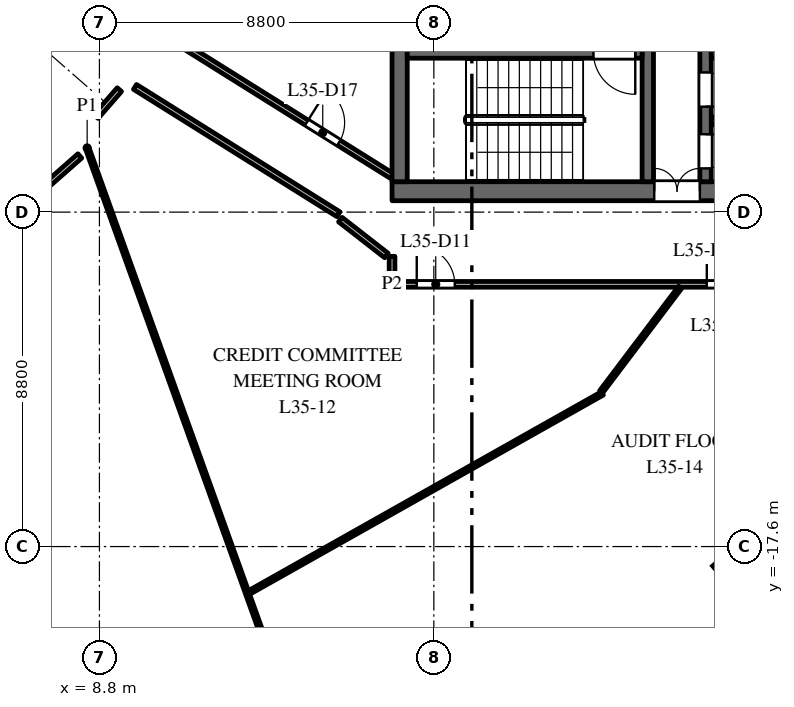
"""IFC4 building model, lengths in metres.
Left out: names, types, materials, properties, quantities, classifications, styles, units other than length and angle.
Written with IfcOpenShell. Run it as: python <this file> out.ifc"""

import sys

from ifc_helpers import new_model, si_unit, direction, frame, frame_2d, origin, origin_2d, place, context, subcontext, project, spatial, rectangle, extrude, element, fill, save


model = new_model("IFC4")
c1 = context("Model", 3, precision=1e-05, world=origin(), true_north=direction((0.0, 1.0)))
c2 = subcontext(c1, "Body", "Model", "MODEL_VIEW")
j1 = project(units=[si_unit("LENGTHUNIT", "METRE"), si_unit("PLANEANGLEUNIT", "RADIAN")], contexts=[c1])
p1 = place(None, origin())
s1 = spatial("IfcSite", under=j1, at=p1, CompositionType="ELEMENT")
p2 = place(p1, origin())
s2 = spatial("IfcBuilding", under=s1, at=p2, CompositionType="ELEMENT")
p3 = place(p2, frame((0.0, 0.0, 154.0)))
s3 = spatial("IfcBuildingStorey", under=s2, at=p3, CompositionType="ELEMENT", Elevation=154.0)
p4 = place(p3, frame((25.783, -18.18, 0.0), z_axis=(0.0, 0.0, 1.0), x_axis=(0.763035199656, 0.646356932419, 0.0)))
e1 = element("IfcColumn", 1, at=p4, inside=s3, PredefinedType="COLUMN", context=c2, shape_type="SweptSolid", body=[
    extrude(rectangle(XDim=1.2, YDim=1.2, at=origin_2d()), origin(), (0.0, 0.0, 1.0), 4.0),
])
p5 = place(p3, frame((16.5, -8.25, 0.0), z_axis=(0.0, 0.0, 1.0), x_axis=(1.0, 0.0, 0.0)))
e2 = element("IfcWall", 2, at=p5, inside=s3, PredefinedType="SHEAR", context=c2, shape_type="SweptSolid", body=[
    extrude(rectangle(XDim=15.0, YDim=0.5, at=frame_2d((7.5, 0.0))), origin(), (0.0, 0.0, 1.0), 3.7),
])
p6 = place(p5, frame((6.9, 0.0, 0.0)))
e3 = element("IfcOpeningElement", 3, at=p6, cuts=e2, PredefinedType="OPENING", context=c2, shape_type="SweptSolid", body=[
    extrude(rectangle(XDim=1.2, YDim=2.1, at=frame_2d((0.6, 1.05))), frame((0.0, 0.26, 0.0), z_axis=(0.0, -1.0, 0.0), x_axis=(1.0, 0.0, 0.0)), (0.0, 0.0, 1.0), 0.52),
])
p7 = place(p5, frame((12.275, 0.0, 0.0)))
e4 = element("IfcOpeningElement", 4, at=p7, cuts=e2, PredefinedType="OPENING", context=c2, shape_type="SweptSolid", body=[
    extrude(rectangle(XDim=0.9, YDim=2.1, at=frame_2d((0.45, 1.05))), frame((0.0, 0.26, 0.0), z_axis=(0.0, -1.0, 0.0), x_axis=(1.0, 0.0, 0.0)), (0.0, 0.0, 1.0), 0.52),
])
p8 = place(p3, frame((24.75, -8.0, 0.0), z_axis=(0.0, 0.0, 1.0), x_axis=(0.0, 1.0, 0.0)))
e5 = element("IfcWall", 5, at=p8, inside=s3, PredefinedType="SHEAR", context=c2, shape_type="SweptSolid", body=[
    extrude(rectangle(XDim=16.0, YDim=0.3, at=frame_2d((8.0, 0.0))), origin(), (0.0, 0.0, 1.0), 3.7),
])
p9 = place(p8, frame((4.425, 0.0, 0.0)))
e6 = element("IfcOpeningElement", 6, at=p9, cuts=e5, PredefinedType="OPENING", context=c2, shape_type="SweptSolid", body=[
    extrude(rectangle(XDim=1.1, YDim=2.1, at=frame_2d((0.55, 1.05))), frame((0.0, 0.16, 0.0), z_axis=(0.0, -1.0, 0.0), x_axis=(1.0, 0.0, 0.0)), (0.0, 0.0, 1.0), 0.32),
])
p10 = place(p8, frame((7.45, 0.0, 0.0)))
e7 = element("IfcOpeningElement", 7, at=p10, cuts=e5, PredefinedType="OPENING", context=c2, shape_type="SweptSolid", body=[
    extrude(rectangle(XDim=1.1, YDim=2.1, at=frame_2d((0.55, 1.05))), frame((0.0, 0.16, 0.0), z_axis=(0.0, -1.0, 0.0), x_axis=(1.0, 0.0, 0.0)), (0.0, 0.0, 1.0), 0.32),
])
p11 = place(p8, frame((10.475, 0.0, 0.0)))
e8 = element("IfcOpeningElement", 8, at=p11, cuts=e5, PredefinedType="OPENING", context=c2, shape_type="SweptSolid", body=[
    extrude(rectangle(XDim=1.1, YDim=2.1, at=frame_2d((0.55, 1.05))), frame((0.0, 0.16, 0.0), z_axis=(0.0, -1.0, 0.0), x_axis=(1.0, 0.0, 0.0)), (0.0, 0.0, 1.0), 0.32),
])
p12 = place(p8, frame((13.75, 0.0, 0.0)))
e9 = element("IfcOpeningElement", 9, at=p12, cuts=e5, PredefinedType="OPENING", context=c2, shape_type="SweptSolid", body=[
    extrude(rectangle(XDim=0.9, YDim=2.1, at=frame_2d((0.45, 1.05))), frame((0.0, 0.16, 0.0), z_axis=(0.0, -1.0, 0.0), x_axis=(1.0, 0.0, 0.0)), (0.0, 0.0, 1.0), 0.32),
])
p13 = place(p8, frame((1.975, 0.0, 0.0)))
e10 = element("IfcOpeningElement", 10, at=p13, cuts=e5, PredefinedType="OPENING", context=c2, shape_type="SweptSolid", body=[
    extrude(rectangle(XDim=0.9, YDim=2.1, at=frame_2d((0.45, 1.05))), frame((0.0, 0.16, 0.0), z_axis=(0.0, -1.0, 0.0), x_axis=(1.0, 0.0, 0.0)), (0.0, 0.0, 1.0), 0.32),
])
p14 = place(p8, frame((0.35, 0.0, 0.0)))
e11 = element("IfcOpeningElement", 11, at=p14, cuts=e5, PredefinedType="OPENING", context=c2, shape_type="SweptSolid", body=[
    extrude(rectangle(XDim=0.9, YDim=2.1, at=frame_2d((0.45, 1.05))), frame((0.0, 0.16, 0.0), z_axis=(0.0, -1.0, 0.0), x_axis=(1.0, 0.0, 0.0)), (0.0, 0.0, 1.0), 0.32),
])
p15 = place(p3, frame((16.7, -8.0, 0.0), z_axis=(0.0, 0.0, 1.0), x_axis=(0.0, 1.0, 0.0)))
e12 = element("IfcWall", 12, at=p15, inside=s3, PredefinedType="SHEAR", context=c2, shape_type="SweptSolid", body=[
    extrude(rectangle(XDim=16.0, YDim=0.4, at=frame_2d((8.0, 0.0))), origin(), (0.0, 0.0, 1.0), 3.7),
])
p16 = place(p3, frame((24.9, -6.4, 0.0), z_axis=(0.0, 0.0, 1.0), x_axis=(1.0, 0.0, 0.0)))
e13 = element("IfcWall", 13, at=p16, inside=s3, PredefinedType="PARTITIONING", context=c2, shape_type="SweptSolid", body=[
    extrude(rectangle(XDim=2.35, YDim=0.2, at=frame_2d((1.175, 0.0))), origin(), (0.0, 0.0, 1.0), 3.7),
])
p17 = place(p3, frame((24.9, -4.6, 0.0), z_axis=(0.0, 0.0, 1.0), x_axis=(1.0, 0.0, 0.0)))
e14 = element("IfcWall", 14, at=p17, inside=s3, PredefinedType="SHEAR", context=c2, shape_type="SweptSolid", body=[
    extrude(rectangle(XDim=6.1, YDim=0.3, at=frame_2d((3.05, 0.0))), origin(), (0.0, 0.0, 1.0), 3.7),
])
p18 = place(p3, frame((23.23, -8.0, 0.0), z_axis=(0.0, 0.0, 1.0), x_axis=(0.0, 1.0, 0.0)))
e15 = element("IfcWall", 15, at=p18, inside=s3, PredefinedType="SHEAR", context=c2, shape_type="SweptSolid", body=[
    extrude(rectangle(XDim=7.875, YDim=0.3, at=frame_2d((3.938, 0.0))), origin(), (0.0, 0.0, 1.0), 3.7),
])
p19 = place(p18, frame((5.15, 0.0, 0.0)))
e16 = element("IfcOpeningElement", 16, at=p19, cuts=e15, PredefinedType="OPENING", context=c2, shape_type="SweptSolid", body=[
    extrude(rectangle(XDim=1.1, YDim=2.1, at=frame_2d((0.55, 1.05))), frame((0.0, 0.16, 0.0), z_axis=(0.0, -1.0, 0.0), x_axis=(1.0, 0.0, 0.0)), (0.0, 0.0, 1.0), 0.32),
])
p20 = place(p3, frame((16.9, -4.6, 0.0), z_axis=(0.0, 0.0, 1.0), x_axis=(1.0, 0.0, 0.0)))
e17 = element("IfcWall", 17, at=p20, inside=s3, PredefinedType="SHEAR", context=c2, shape_type="SweptSolid", body=[
    extrude(rectangle(XDim=6.18, YDim=0.3, at=frame_2d((3.09, 0.0))), origin(), (0.0, 0.0, 1.0), 3.7),
])
p21 = place(p20, frame((4.9, 0.0, 0.0)))
e18 = element("IfcOpeningElement", 18, at=p21, cuts=e17, PredefinedType="OPENING", context=c2, shape_type="SweptSolid", body=[
    extrude(rectangle(XDim=1.1, YDim=2.1, at=frame_2d((0.55, 1.05))), frame((0.0, 0.16, 0.0), z_axis=(0.0, -1.0, 0.0), x_axis=(1.0, 0.0, 0.0)), (0.0, 0.0, 1.0), 0.32),
])
p22 = place(p3, frame((7.458, -8.049, 0.0), z_axis=(0.0, 0.0, 1.0), x_axis=(0.75060787095, 0.660747927782, 0.0)))
e19 = element("IfcWall", 19, at=p22, inside=s3, PredefinedType="PARTITIONING", context=c2, shape_type="SweptSolid", body=[
    extrude(rectangle(XDim=1.1, YDim=0.15, at=frame_2d((0.55, 0.0))), origin(), (0.0, 0.0, 1.0), 3.7),
])
p23 = place(p3, frame((8.477, -7.111, 0.0), z_axis=(0.0, 0.0, 1.0), x_axis=(0.338406456341, -0.941000037357, 0.0)))
e20 = element("IfcWall", 20, at=p23, inside=s3, PredefinedType="PARTITIONING", context=c2, shape_type="SweptSolid", body=[
    extrude(rectangle(XDim=19.418, YDim=0.1, at=frame_2d((9.709, 0.0))), origin(), (0.0, 0.0, 1.0), 2.85),
])
p24 = place(p3, frame((8.709, -6.285, 0.0), z_axis=(0.0, 0.0, 1.0), x_axis=(0.656365478363, 0.754443078578, 0.0)))
e21 = element("IfcWall", 21, at=p24, inside=s3, PredefinedType="PARTITIONING", context=c2, shape_type="SweptSolid", body=[
    extrude(rectangle(XDim=0.938, YDim=0.15, at=frame_2d((0.469, 0.0))), origin(), (0.0, 0.0, 1.0), 3.7),
])
p25 = place(p3, frame((9.736, -5.505, 0.0), z_axis=(0.0, 0.0, 1.0), x_axis=(0.847611500167, -0.53061732424, 0.0)))
e22 = element("IfcWall", 22, at=p25, inside=s3, PredefinedType="PARTITIONING", context=c2, shape_type="SweptSolid", body=[
    extrude(rectangle(XDim=6.315, YDim=0.15, at=frame_2d((3.158, 0.0))), origin(), (0.0, 0.0, 1.0), 3.7),
])
p26 = place(p3, frame((10.752, -4.254, 0.0), z_axis=(0.0, 0.0, 1.0), x_axis=(0.847690706888, -0.530490777917, 0.0)))
e23 = element("IfcWall", 23, at=p26, inside=s3, PredefinedType="PARTITIONING", context=c2, shape_type="SweptSolid", body=[
    extrude(rectangle(XDim=6.781, YDim=0.15, at=frame_2d((3.39, 0.0))), origin(), (0.0, 0.0, 1.0), 3.7),
])
p27 = place(p26, frame((4.129, 0.0, 0.0)))
e24 = element("IfcOpeningElement", 24, at=p27, cuts=e23, PredefinedType="OPENING", context=c2, shape_type="SweptSolid", body=[
    extrude(rectangle(XDim=1.0, YDim=2.1, at=frame_2d((0.5, 1.05))), frame((0.0, 0.085, 0.0), z_axis=(0.0, -1.0, 0.0), x_axis=(1.0, 0.0, 0.0)), (0.0, 0.0, 1.0), 0.17),
])
p28 = place(p3, frame((12.737, -18.809, 0.0), z_axis=(0.0, 0.0, 1.0), x_axis=(0.871198990541, 0.490930054978, 0.0)))
e25 = element("IfcWall", 25, at=p28, inside=s3, PredefinedType="PARTITIONING", context=c2, shape_type="SweptSolid", body=[
    extrude(rectangle(XDim=10.674, YDim=0.1, at=frame_2d((5.337, 0.0))), origin(), (0.0, 0.0, 1.0), 3.7),
])
p29 = place(p3, frame((16.5, -10.7, 0.0), z_axis=(0.0, 0.0, 1.0), x_axis=(0.0, 1.0, 0.0)))
e26 = element("IfcWall", 26, at=p29, inside=s3, PredefinedType="PARTITIONING", context=c2, shape_type="SweptSolid", body=[
    extrude(rectangle(XDim=0.736, YDim=0.15, at=frame_2d((0.368, 0.0))), origin(), (0.0, 0.0, 1.0), 3.7),
])
p30 = place(p3, frame((16.5, -10.7, 0.0), z_axis=(0.0, 0.0, 1.0), x_axis=(1.0, 0.0, 0.0)))
e27 = element("IfcWall", 27, at=p30, inside=s3, PredefinedType="PARTITIONING", context=c2, shape_type="SweptSolid", body=[
    extrude(rectangle(XDim=15.0, YDim=0.15, at=frame_2d((7.5, 0.0))), origin(), (0.0, 0.0, 1.0), 2.75),
])
p31 = place(p30, frame((0.65, 0.0, 0.0)))
e28 = element("IfcOpeningElement", 28, at=p31, cuts=e27, PredefinedType="OPENING", context=c2, shape_type="SweptSolid", body=[
    extrude(rectangle(XDim=1.0, YDim=2.1, at=frame_2d((0.5, 1.05))), frame((0.0, 0.085, 0.0), z_axis=(0.0, -1.0, 0.0), x_axis=(1.0, 0.0, 0.0)), (0.0, 0.0, 1.0), 0.17),
])
p32 = place(p30, frame((8.283, 0.0, 0.0)))
e29 = element("IfcOpeningElement", 29, at=p32, cuts=e27, PredefinedType="OPENING", context=c2, shape_type="SweptSolid", body=[
    extrude(rectangle(XDim=1.0, YDim=2.1, at=frame_2d((0.5, 1.05))), frame((0.0, 0.085, 0.0), z_axis=(0.0, -1.0, 0.0), x_axis=(1.0, 0.0, 0.0)), (0.0, 0.0, 1.0), 0.17),
])
p33 = place(p3, frame((22.002, -13.53, 0.0), z_axis=(0.0, 0.0, 1.0), x_axis=(0.602805050744, 0.797888507749, 0.0)))
e30 = element("IfcWall", 30, at=p33, inside=s3, PredefinedType="PARTITIONING", context=c2, shape_type="SweptSolid", body=[
    extrude(rectangle(XDim=3.449, YDim=0.1, at=frame_2d((1.725, 0.0))), origin(), (0.0, 0.0, 1.0), 2.75),
])
p34 = place(p3, frame((16.352, -9.942, 0.0), z_axis=(0.0, 0.0, 1.0), x_axis=(-0.788950226826, 0.614457109643, 0.0)))
e31 = element("IfcWall", 31, at=p34, inside=s3, PredefinedType="PARTITIONING", context=c2, shape_type="SweptSolid", body=[
    extrude(rectangle(XDim=1.538, YDim=0.15, at=frame_2d((0.769, 0.0))), origin(), (0.0, 0.0, 1.0), 3.7),
])
p35 = place(p21, origin())
e32 = element("IfcDoor", 32, at=p35, inside=s3, OperationType="SINGLE_SWING_RIGHT", PredefinedType="DOOR", context=c2, shape_type="SweptSolid", body=[
    extrude(rectangle(XDim=1.1, YDim=2.1, at=frame_2d((0.55, 1.05))), frame((0.0, 0.025, 0.0), z_axis=(0.0, -1.0, 0.0), x_axis=(1.0, 0.0, 0.0)), (0.0, 0.0, 1.0), 0.05),
])
fill(e18, e32)
p36 = place(p6, origin())
e33 = element("IfcDoor", 33, at=p36, inside=s3, OperationType="DOUBLE_DOOR_DOUBLE_SWING", PredefinedType="DOOR", context=c2, shape_type="SweptSolid", body=[
    extrude(rectangle(XDim=1.2, YDim=2.1, at=frame_2d((0.6, 1.05))), frame((0.0, 0.025, 0.0), z_axis=(0.0, -1.0, 0.0), x_axis=(1.0, 0.0, 0.0)), (0.0, 0.0, 1.0), 0.05),
])
fill(e3, e33)
p37 = place(p13, origin())
e34 = element("IfcDoor", 34, at=p37, inside=s3, OperationType="SINGLE_SWING_LEFT", PredefinedType="DOOR", context=c2, shape_type="SweptSolid", body=[
    extrude(rectangle(XDim=0.9, YDim=2.1, at=frame_2d((0.45, 1.05))), frame((0.0, 0.025, 0.0), z_axis=(0.0, -1.0, 0.0), x_axis=(1.0, 0.0, 0.0)), (0.0, 0.0, 1.0), 0.05),
])
fill(e10, e34)
p38 = place(p14, origin())
e35 = element("IfcDoor", 35, at=p38, inside=s3, OperationType="SINGLE_SWING_RIGHT", PredefinedType="DOOR", context=c2, shape_type="SweptSolid", body=[
    extrude(rectangle(XDim=0.9, YDim=2.1, at=frame_2d((0.45, 1.05))), frame((0.0, 0.025, 0.0), z_axis=(0.0, -1.0, 0.0), x_axis=(1.0, 0.0, 0.0)), (0.0, 0.0, 1.0), 0.05),
])
fill(e11, e35)
p39 = place(p31, origin())
e36 = element("IfcDoor", 36, at=p39, inside=s3, OperationType="SINGLE_SWING_LEFT", PredefinedType="DOOR", context=c2, shape_type="SweptSolid", body=[
    extrude(rectangle(XDim=1.0, YDim=2.1, at=frame_2d((0.5, 1.05))), frame((0.0, 0.025, 0.0), z_axis=(0.0, -1.0, 0.0), x_axis=(1.0, 0.0, 0.0)), (0.0, 0.0, 1.0), 0.05),
])
fill(e28, e36)
p40 = place(p32, origin())
e37 = element("IfcDoor", 37, at=p40, inside=s3, OperationType="SINGLE_SWING_LEFT", PredefinedType="DOOR", context=c2, shape_type="SweptSolid", body=[
    extrude(rectangle(XDim=1.0, YDim=2.1, at=frame_2d((0.5, 1.05))), frame((0.0, 0.025, 0.0), z_axis=(0.0, -1.0, 0.0), x_axis=(1.0, 0.0, 0.0)), (0.0, 0.0, 1.0), 0.05),
])
fill(e29, e37)
p41 = place(p27, origin())
e38 = element("IfcDoor", 38, at=p41, inside=s3, OperationType="SINGLE_SWING_LEFT", PredefinedType="DOOR", context=c2, shape_type="SweptSolid", body=[
    extrude(rectangle(XDim=1.0, YDim=2.1, at=frame_2d((0.5, 1.05))), frame((0.0, 0.025, 0.0), z_axis=(0.0, -1.0, 0.0), x_axis=(1.0, 0.0, 0.0)), (0.0, 0.0, 1.0), 0.05),
])
fill(e24, e38)
save(model, sys.argv[1])
